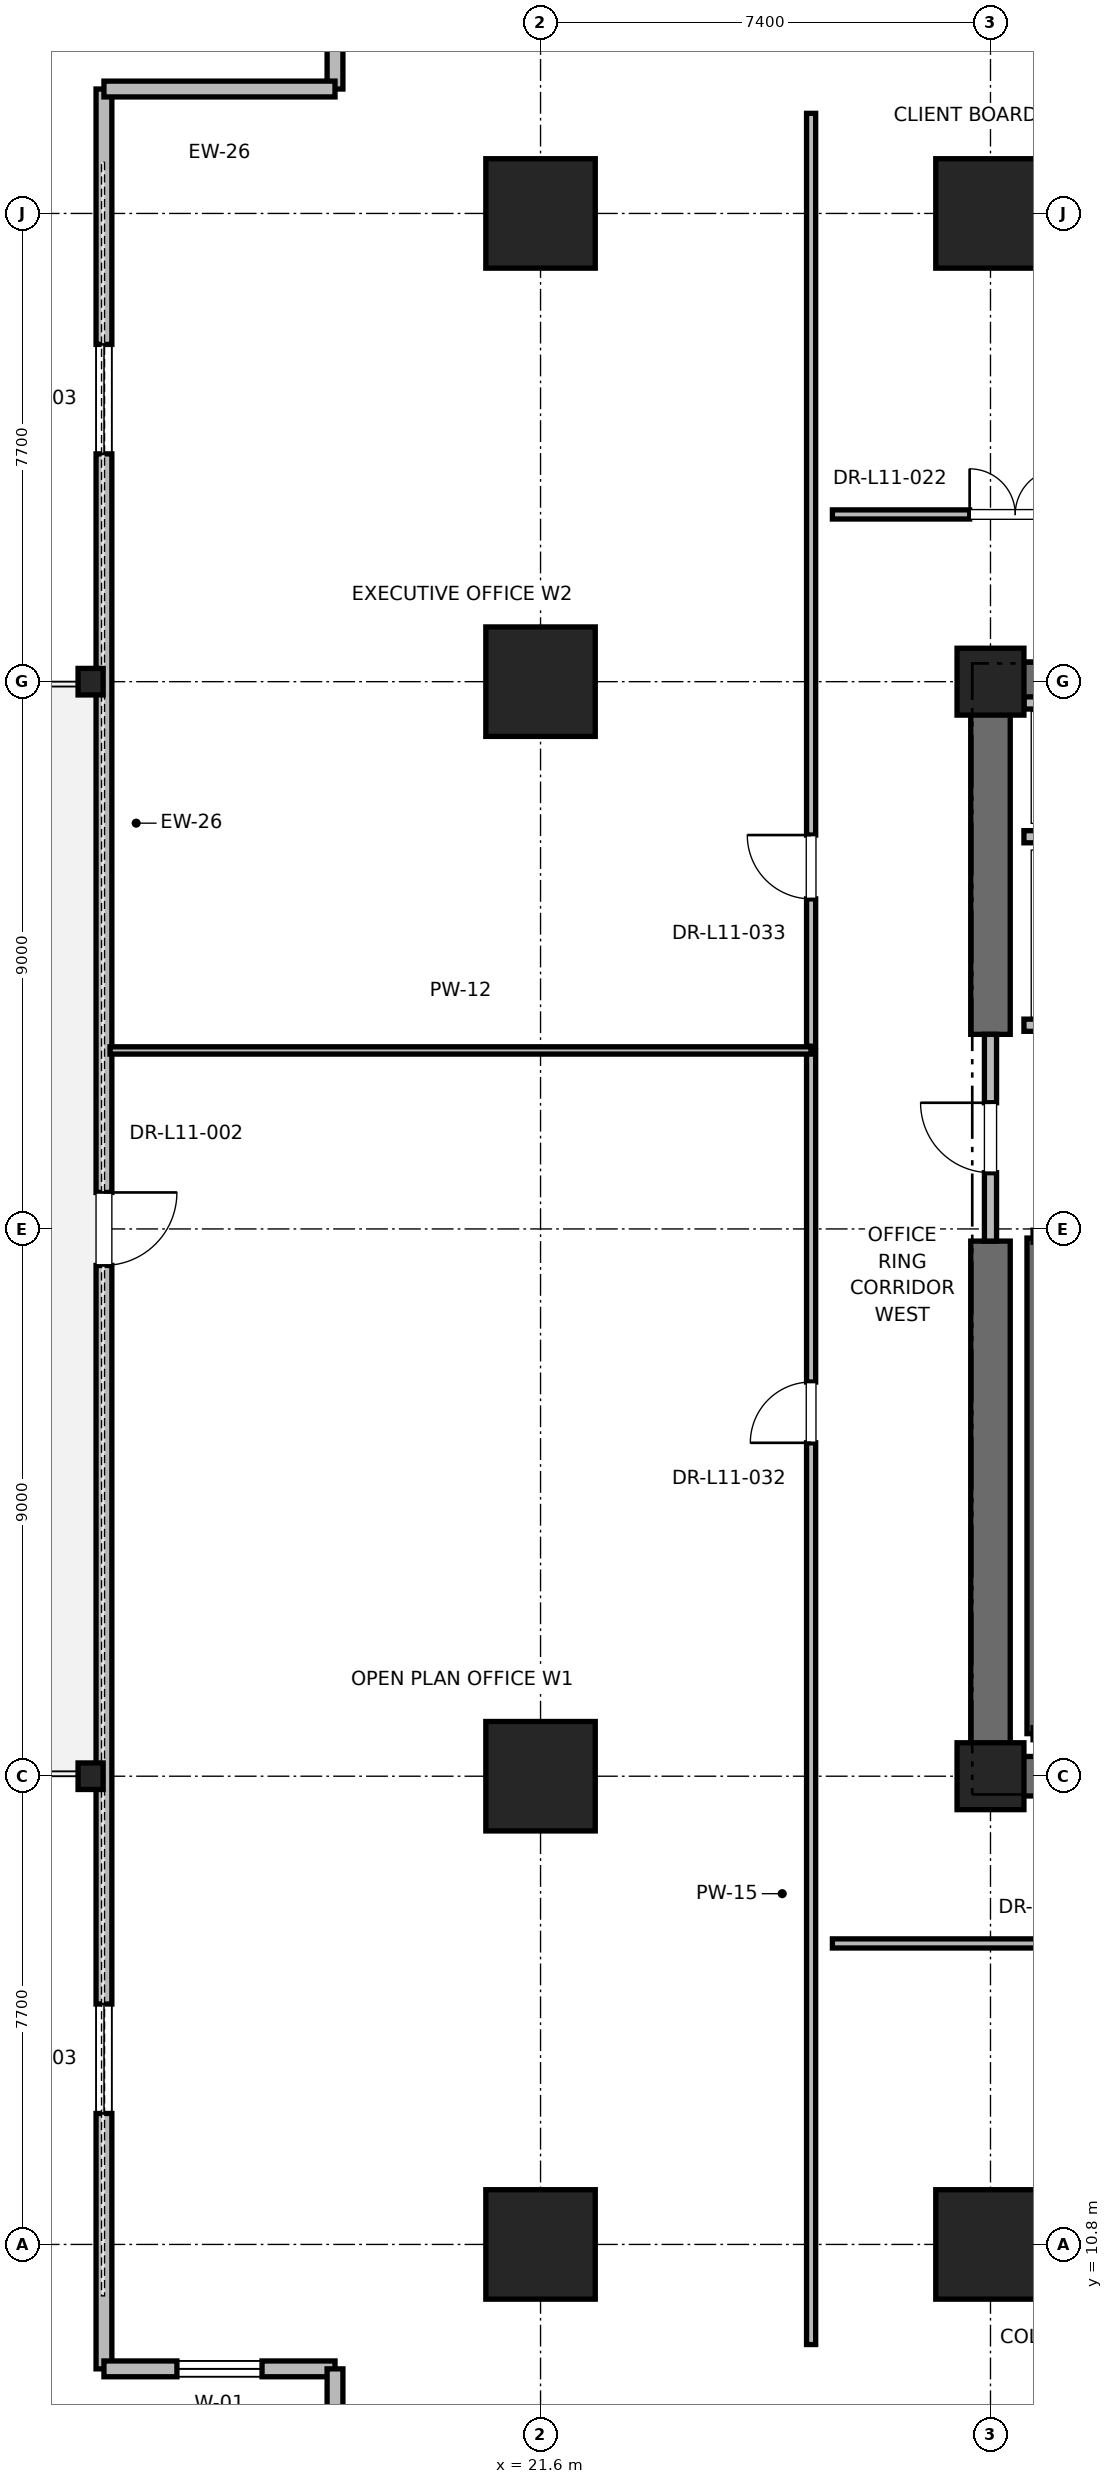
"""IFC4 building model, lengths in metres.
Left out: names, types, materials, properties, quantities, classifications, styles, units other than length and angle.
Written with IfcOpenShell. Run it as: python <this file> out.ifc"""

import sys

from ifc_helpers import new_model, si_unit, direction, frame, frame_2d, origin, origin_2d, place, context, subcontext, project, spatial, rectangle, i_section, extrude, element, fill, save


model = new_model("IFC4")
c1 = context("Model", 3, precision=1e-05, world=origin(), true_north=direction((0.0, 1.0)))
c2 = subcontext(c1, "Body", "Model", "MODEL_VIEW")
j1 = project(units=[si_unit("LENGTHUNIT", "METRE"), si_unit("PLANEANGLEUNIT", "RADIAN")], contexts=[c1])
p1 = place(None, origin())
s1 = spatial("IfcSite", under=j1, at=p1, CompositionType="ELEMENT")
p2 = place(p1, origin())
s2 = spatial("IfcBuilding", under=s1, at=p2, CompositionType="ELEMENT")
p3 = place(p2, frame((0.0, 0.0, 51.6)))
s3 = spatial("IfcBuildingStorey", under=s2, at=p3, CompositionType="ELEMENT", Elevation=51.6)
for number, where, z_axis, x_axis in (
    (1, (29.0, 10.8, 0.0), (0.0, 0.0, 1.0), (1.0, 0.0, 0.0)),
    (2, (29.0, 44.2, 0.0), (0.0, 0.0, 1.0), (1.0, 0.0, 0.0)),
    (3, (21.6, 18.5, 0.0), (0.0, 0.0, 1.0), (1.0, 0.0, 0.0)),
    (4, (21.6, 36.5, 0.0), (0.0, 0.0, 1.0), (1.0, 0.0, 0.0)),
    (5, (21.6, 10.8, 0.0), (0.0, 0.0, 1.0), (1.0, 0.0, 0.0)),
    (6, (21.6, 44.2, 0.0), (0.0, 0.0, 1.0), (1.0, 0.0, 0.0)),
):
    element("IfcColumn", number, at=place(p3, frame(where, z_axis=z_axis, x_axis=x_axis)), inside=s3, PredefinedType="COLUMN", context=c2, shape_type="SweptSolid", body=[
        extrude(rectangle(XDim=1.8, YDim=1.8, at=origin_2d()), origin(), (0.0, 0.0, 1.0), 4.0),
    ])
for number, where, z_axis, x_axis in (
    (7, (14.2, 18.5, 0.0), (0.0, 0.0, 1.0), (1.0, 0.0, 0.0)),
    (8, (14.2, 36.5, 0.0), (0.0, 0.0, 1.0), (1.0, 0.0, 0.0)),
):
    element("IfcColumn", number, at=place(p3, frame(where, z_axis=z_axis, x_axis=x_axis)), inside=s3, PredefinedType="COLUMN", context=c2, shape_type="SweptSolid", body=[
        extrude(i_section(OverallWidth=0.412, OverallDepth=0.437, WebThickness=0.036, FlangeThickness=0.058, FilletRadius=0.015, at=origin_2d()), origin(), (0.0, 0.0, 1.0), 4.0),
    ])
for number, where, z_axis, x_axis in (
    (9, (29.0, 18.5, 0.0), (0.0, 0.0, 1.0), (1.0, 0.0, 0.0)),
    (10, (29.0, 36.5, 0.0), (0.0, 0.0, 1.0), (1.0, 0.0, 0.0)),
):
    element("IfcColumn", number, at=place(p3, frame(where, z_axis=z_axis, x_axis=x_axis)), inside=s3, PredefinedType="PILASTER", context=c2, shape_type="SweptSolid", body=[
        extrude(rectangle(XDim=1.1, YDim=1.1, at=origin_2d()), origin(), (0.0, 0.0, 1.0), 4.0),
    ])
p4 = place(p3, frame((29.0, 18.5, 0.0), z_axis=(0.0, 0.0, 1.0), x_axis=(1.0, 0.0, 0.0)))
e11 = element("IfcWall", 11, at=p4, inside=s3, PredefinedType="SHEAR", context=c2, shape_type="SweptSolid", body=[
    extrude(rectangle(XDim=9.2, YDim=0.65, at=frame_2d((4.6, 0.0))), origin(), (0.0, 0.0, 1.0), 3.76),
])
p5 = place(p3, frame((29.0, 36.5, 0.0), z_axis=(0.0, 0.0, 1.0), x_axis=(1.0, 0.0, 0.0)))
e12 = element("IfcWall", 12, at=p5, inside=s3, PredefinedType="SHEAR", context=c2, shape_type="SweptSolid", body=[
    extrude(rectangle(XDim=5.8, YDim=0.65, at=frame_2d((2.9, 0.0))), origin(), (0.0, 0.0, 1.0), 3.76),
])
p6 = place(p3, frame((29.0, 18.5, 0.0), z_axis=(0.0, 0.0, 1.0), x_axis=(0.0, 1.0, 0.0)))
e13 = element("IfcWall", 13, at=p6, inside=s3, PredefinedType="SHEAR", context=c2, shape_type="SweptSolid", body=[
    extrude(rectangle(XDim=8.8, YDim=0.65, at=frame_2d((4.4, 0.0))), origin(), (0.0, 0.0, 1.0), 3.76),
])
p7 = place(p3, frame((29.0, 30.7, 0.0), z_axis=(0.0, 0.0, 1.0), x_axis=(0.0, 1.0, 0.0)))
e14 = element("IfcWall", 14, at=p7, inside=s3, PredefinedType="SHEAR", context=c2, shape_type="SweptSolid", body=[
    extrude(rectangle(XDim=5.8, YDim=0.65, at=frame_2d((2.9, 0.0))), origin(), (0.0, 0.0, 1.0), 3.76),
])
p8 = place(p3, frame((14.42, 46.246, 0.0), z_axis=(0.0, 0.0, 1.0), x_axis=(0.0, -1.0, 0.0)))
e15 = element("IfcWall", 15, at=p8, inside=s3, PredefinedType="PARAPET", context=c2, shape_type="SweptSolid", body=[
    extrude(rectangle(XDim=37.492, YDim=0.26, at=frame_2d((18.746, 0.0))), origin(), (0.0, 0.0, 1.0), 2.889),
])
p9 = place(p8, frame((4.2, 0.0, 0.85)))
e16 = element("IfcOpeningElement", 16, at=p9, cuts=e15, PredefinedType="OPENING", context=c2, shape_type="SweptSolid", body=[
    extrude(rectangle(XDim=1.8, YDim=2.2, at=frame_2d((0.9, 1.1))), frame((0.0, 0.13, 0.0), z_axis=(0.0, -1.0, 0.0), x_axis=(1.0, 0.0, 0.0)), (0.0, 0.0, 1.0), 0.26),
])
p10 = place(p8, frame((18.146, 0.0, 0.0)))
e17 = element("IfcOpeningElement", 17, at=p10, cuts=e15, PredefinedType="OPENING", context=c2, shape_type="SweptSolid", body=[
    extrude(rectangle(XDim=1.2, YDim=2.2, at=frame_2d((0.6, 1.1))), frame((0.0, 0.13, 0.0), z_axis=(0.0, -1.0, 0.0), x_axis=(1.0, 0.0, 0.0)), (0.0, 0.0, 1.0), 0.26),
])
p11 = place(p8, frame((31.492, 0.0, 0.85)))
e18 = element("IfcOpeningElement", 18, at=p11, cuts=e15, PredefinedType="OPENING", context=c2, shape_type="SweptSolid", body=[
    extrude(rectangle(XDim=1.8, YDim=2.2, at=frame_2d((0.9, 1.1))), frame((0.0, 0.13, 0.0), z_axis=(0.0, -1.0, 0.0), x_axis=(1.0, 0.0, 0.0)), (0.0, 0.0, 1.0), 0.26),
])
p12 = place(p3, frame((14.42, 8.754, 0.0), z_axis=(0.0, 0.0, 1.0), x_axis=(1.0, 0.0, 0.0)))
e19 = element("IfcWall", 19, at=p12, inside=s3, PredefinedType="PARAPET", context=c2, shape_type="SweptSolid", body=[
    extrude(rectangle(XDim=3.8, YDim=0.26, at=frame_2d((1.9, 0.0))), origin(), (0.0, 0.0, 1.0), 3.76),
])
p13 = place(p12, frame((1.2, 0.0, 0.85)))
e20 = element("IfcOpeningElement", 20, at=p13, cuts=e19, PredefinedType="OPENING", context=c2, shape_type="SweptSolid", body=[
    extrude(rectangle(XDim=1.4, YDim=2.0, at=frame_2d((0.7, 1.0))), frame((0.0, 0.13, 0.0), z_axis=(0.0, -1.0, 0.0), x_axis=(1.0, 0.0, 0.0)), (0.0, 0.0, 1.0), 0.26),
])
p14 = place(p3, frame((18.22, 8.754, 0.0), z_axis=(0.0, 0.0, 1.0), x_axis=(0.0, -1.0, 0.0)))
e21 = element("IfcWall", 21, at=p14, inside=s3, PredefinedType="PARAPET", context=c2, shape_type="SweptSolid", body=[
    extrude(rectangle(XDim=3.4, YDim=0.26, at=frame_2d((1.7, 0.0))), origin(), (0.0, 0.0, 1.0), 3.76),
])
p15 = place(p3, frame((18.22, 49.646, 0.0), z_axis=(0.0, 0.0, 1.0), x_axis=(0.0, -1.0, 0.0)))
e22 = element("IfcWall", 22, at=p15, inside=s3, PredefinedType="PARAPET", context=c2, shape_type="SweptSolid", body=[
    extrude(rectangle(XDim=3.4, YDim=0.26, at=frame_2d((1.7, 0.0))), origin(), (0.0, 0.0, 1.0), 3.76),
])
p16 = place(p15, frame((1.0, 0.0, 0.85)))
e23 = element("IfcOpeningElement", 23, at=p16, cuts=e22, PredefinedType="OPENING", context=c2, shape_type="SweptSolid", body=[
    extrude(rectangle(XDim=1.4, YDim=2.0, at=frame_2d((0.7, 1.0))), frame((0.0, 0.13, 0.0), z_axis=(0.0, -1.0, 0.0), x_axis=(1.0, 0.0, 0.0)), (0.0, 0.0, 1.0), 0.26),
])
p17 = place(p3, frame((18.22, 46.246, 0.0), z_axis=(0.0, 0.0, 1.0), x_axis=(-1.0, 0.0, 0.0)))
e24 = element("IfcWall", 24, at=p17, inside=s3, PredefinedType="PARAPET", context=c2, shape_type="SweptSolid", body=[
    extrude(rectangle(XDim=3.8, YDim=0.26, at=frame_2d((1.9, 0.0))), origin(), (0.0, 0.0, 1.0), 3.76),
])
p18 = place(p3, frame((29.7, 19.2, 0.0), z_axis=(0.0, 0.0, 1.0), x_axis=(0.0, 1.0, 0.0)))
e25 = element("IfcWall", 25, at=p18, inside=s3, PredefinedType="SOLIDWALL", context=c2, shape_type="SweptSolid", body=[
    extrude(rectangle(XDim=8.15, YDim=0.2, at=frame_2d((4.075, 0.0))), origin(), (0.0, 0.0, 1.0), 3.76),
])
p19 = place(p3, frame((29.0, 27.3, 0.0), z_axis=(0.0, 0.0, 1.0), x_axis=(0.0, 1.0, 0.0)))
e26 = element("IfcWall", 26, at=p19, inside=s3, PredefinedType="PARTITIONING", context=c2, shape_type="SweptSolid", body=[
    extrude(rectangle(XDim=3.4, YDim=0.2, at=frame_2d((1.7, 0.0))), origin(), (0.0, 0.0, 1.0), 2.54),
])
p20 = place(p19, frame((1.125, 0.0, 0.0)))
e27 = element("IfcOpeningElement", 27, at=p20, cuts=e26, PredefinedType="OPENING", context=c2, shape_type="SweptSolid", body=[
    extrude(rectangle(XDim=1.15, YDim=2.2, at=frame_2d((0.575, 1.1))), frame((0.0, 0.1, 0.0), z_axis=(0.0, -1.0, 0.0), x_axis=(1.0, 0.0, 0.0)), (0.0, 0.0, 1.0), 0.2),
])
p21 = place(p3, frame((29.55, 30.85, 0.0), z_axis=(0.0, 0.0, 1.0), x_axis=(1.0, 0.0, 0.0)))
e28 = element("IfcWall", 28, at=p21, inside=s3, PredefinedType="SOLIDWALL", context=c2, shape_type="SweptSolid", body=[
    extrude(rectangle(XDim=2.6, YDim=0.2, at=frame_2d((1.3, 0.0))), origin(), (0.0, 0.0, 1.0), 2.54),
])
p22 = place(p21, frame((0.75, 0.0, 0.0)))
e29 = element("IfcOpeningElement", 29, at=p22, cuts=e28, PredefinedType="OPENING", context=c2, shape_type="SweptSolid", body=[
    extrude(rectangle(XDim=1.1, YDim=2.2, at=frame_2d((0.55, 1.1))), frame((0.0, 0.1, 0.0), z_axis=(0.0, -1.0, 0.0), x_axis=(1.0, 0.0, 0.0)), (0.0, 0.0, 1.0), 0.2),
])
p23 = place(p3, frame((29.55, 33.95, 0.0), z_axis=(0.0, 0.0, 1.0), x_axis=(1.0, 0.0, 0.0)))
e30 = element("IfcWall", 30, at=p23, inside=s3, PredefinedType="SOLIDWALL", context=c2, shape_type="SweptSolid", body=[
    extrude(rectangle(XDim=2.8, YDim=0.2, at=frame_2d((1.4, 0.0))), origin(), (0.0, 0.0, 1.0), 3.76),
])
p24 = place(p3, frame((32.35, 36.15, 0.0), z_axis=(0.0, 0.0, 1.0), x_axis=(-1.0, 0.0, 0.0)))
e31 = element("IfcWall", 31, at=p24, inside=s3, PredefinedType="SOLIDWALL", context=c2, shape_type="SweptSolid", body=[
    extrude(rectangle(XDim=2.8, YDim=0.2, at=frame_2d((1.4, 0.0))), origin(), (0.0, 0.0, 1.0), 2.889),
])
p25 = place(p3, frame((26.4, 39.25, 0.0), z_axis=(0.0, 0.0, 1.0), x_axis=(1.0, 0.0, 0.0)))
e32 = element("IfcWall", 32, at=p25, inside=s3, PredefinedType="PARTITIONING", context=c2, shape_type="SweptSolid", body=[
    extrude(rectangle(XDim=5.984, YDim=0.15, at=frame_2d((2.992, 0.0))), origin(), (0.0, 0.0, 1.0), 2.85),
])
p26 = place(p25, frame((2.257, 0.0, 0.0)))
e33 = element("IfcOpeningElement", 33, at=p26, cuts=e32, PredefinedType="OPENING", context=c2, shape_type="SweptSolid", body=[
    extrude(rectangle(XDim=1.5, YDim=2.25, at=frame_2d((0.75, 1.125))), frame((0.0, 0.075, 0.0), z_axis=(0.0, -1.0, 0.0), x_axis=(1.0, 0.0, 0.0)), (0.0, 0.0, 1.0), 0.15),
])
p27 = place(p3, frame((26.4, 15.75, 0.0), z_axis=(0.0, 0.0, 1.0), x_axis=(1.0, 0.0, 0.0)))
e34 = element("IfcWall", 34, at=p27, inside=s3, PredefinedType="PARTITIONING", context=c2, shape_type="SweptSolid", body=[
    extrude(rectangle(XDim=11.424, YDim=0.15, at=frame_2d((5.712, 0.0))), origin(), (0.0, 0.0, 1.0), 2.85),
])
p28 = place(p27, frame((5.227, 0.0, 0.0)))
e35 = element("IfcOpeningElement", 35, at=p28, cuts=e34, PredefinedType="OPENING", context=c2, shape_type="SweptSolid", body=[
    extrude(rectangle(XDim=1.0, YDim=2.15, at=frame_2d((0.5, 1.075))), frame((0.0, 0.075, 0.0), z_axis=(0.0, -1.0, 0.0), x_axis=(1.0, 0.0, 0.0)), (0.0, 0.0, 1.0), 0.15),
])
p29 = place(p3, frame((26.05, 9.154, 0.0), z_axis=(0.0, 0.0, 1.0), x_axis=(0.0, 1.0, 0.0)))
e36 = element("IfcWall", 36, at=p29, inside=s3, PredefinedType="PARTITIONING", context=c2, shape_type="SweptSolid", body=[
    extrude(rectangle(XDim=21.281, YDim=0.15, at=frame_2d((10.641, 0.0))), origin(), (0.0, 0.0, 1.0), 2.85),
])
p30 = place(p29, frame((14.829, 0.0, 0.0)))
e37 = element("IfcOpeningElement", 37, at=p30, cuts=e36, PredefinedType="OPENING", context=c2, shape_type="SweptSolid", body=[
    extrude(rectangle(XDim=1.0, YDim=2.15, at=frame_2d((0.5, 1.075))), frame((0.0, 0.075, 0.0), z_axis=(0.0, -1.0, 0.0), x_axis=(1.0, 0.0, 0.0)), (0.0, 0.0, 1.0), 0.15),
])
p31 = place(p3, frame((14.52, 30.435, 0.0), z_axis=(0.0, 0.0, 1.0), x_axis=(1.0, 0.0, 0.0)))
e38 = element("IfcWall", 38, at=p31, inside=s3, PredefinedType="PARTITIONING", context=c2, shape_type="SweptSolid", body=[
    extrude(rectangle(XDim=11.53, YDim=0.12, at=frame_2d((5.765, 0.0))), origin(), (0.0, 0.0, 1.0), 2.85),
])
p32 = place(p3, frame((26.05, 30.505, 0.0), z_axis=(0.0, 0.0, 1.0), x_axis=(0.0, 1.0, 0.0)))
e39 = element("IfcWall", 39, at=p32, inside=s3, PredefinedType="PARTITIONING", context=c2, shape_type="SweptSolid", body=[
    extrude(rectangle(XDim=15.341, YDim=0.15, at=frame_2d((7.67, 0.0))), origin(), (0.0, 0.0, 1.0), 2.85),
])
p33 = place(p32, frame((2.422, 0.0, 0.0)))
e40 = element("IfcOpeningElement", 40, at=p33, cuts=e39, PredefinedType="OPENING", context=c2, shape_type="SweptSolid", body=[
    extrude(rectangle(XDim=1.05, YDim=2.2, at=frame_2d((0.525, 1.1))), frame((0.0, 0.075, 0.0), z_axis=(0.0, -1.0, 0.0), x_axis=(1.0, 0.0, 0.0)), (0.0, 0.0, 1.0), 0.15),
])
p34 = place(p9, origin())
e41 = element("IfcWindow", 41, at=p34, inside=s3, PartitioningType="SINGLE_PANEL", PredefinedType="WINDOW", context=c2, shape_type="SweptSolid", body=[
    extrude(rectangle(XDim=1.8, YDim=2.2, at=frame_2d((0.9, 1.1))), frame((0.0, 0.03, 0.0), z_axis=(0.0, -1.0, 0.0), x_axis=(1.0, 0.0, 0.0)), (0.0, 0.0, 1.0), 0.06),
])
fill(e16, e41)
p35 = place(p10, origin())
e42 = element("IfcDoor", 42, at=p35, inside=s3, OperationType="SINGLE_SWING_LEFT", PredefinedType="DOOR", context=c2, shape_type="SweptSolid", body=[
    extrude(rectangle(XDim=1.2, YDim=2.2, at=frame_2d((0.6, 1.1))), frame((0.0, 0.025, 0.0), z_axis=(0.0, -1.0, 0.0), x_axis=(1.0, 0.0, 0.0)), (0.0, 0.0, 1.0), 0.05),
])
fill(e17, e42)
p36 = place(p11, origin())
e43 = element("IfcWindow", 43, at=p36, inside=s3, PartitioningType="SINGLE_PANEL", PredefinedType="WINDOW", context=c2, shape_type="SweptSolid", body=[
    extrude(rectangle(XDim=1.8, YDim=2.2, at=frame_2d((0.9, 1.1))), frame((0.0, 0.03, 0.0), z_axis=(0.0, -1.0, 0.0), x_axis=(1.0, 0.0, 0.0)), (0.0, 0.0, 1.0), 0.06),
])
fill(e18, e43)
p37 = place(p13, origin())
e44 = element("IfcWindow", 44, at=p37, inside=s3, PartitioningType="SINGLE_PANEL", PredefinedType="WINDOW", context=c2, shape_type="SweptSolid", body=[
    extrude(rectangle(XDim=1.4, YDim=2.0, at=frame_2d((0.7, 1.0))), frame((0.0, 0.03, 0.0), z_axis=(0.0, -1.0, 0.0), x_axis=(1.0, 0.0, 0.0)), (0.0, 0.0, 1.0), 0.06),
])
fill(e20, e44)
p38 = place(p20, origin())
e45 = element("IfcDoor", 45, at=p38, inside=s3, OperationType="SINGLE_SWING_RIGHT", PredefinedType="DOOR", context=c2, shape_type="SweptSolid", body=[
    extrude(rectangle(XDim=1.15, YDim=2.2, at=frame_2d((0.575, 1.1))), frame((0.0, 0.025, 0.0), z_axis=(0.0, -1.0, 0.0), x_axis=(1.0, 0.0, 0.0)), (0.0, 0.0, 1.0), 0.05),
])
fill(e27, e45)
p39 = place(p26, origin())
e46 = element("IfcDoor", 46, at=p39, inside=s3, OperationType="DOUBLE_DOOR_SINGLE_SWING", PredefinedType="DOOR", context=c2, shape_type="SweptSolid", body=[
    extrude(rectangle(XDim=1.5, YDim=2.25, at=frame_2d((0.75, 1.125))), frame((0.0, 0.025, 0.0), z_axis=(0.0, -1.0, 0.0), x_axis=(1.0, 0.0, 0.0)), (0.0, 0.0, 1.0), 0.05),
])
fill(e33, e46)
p40 = place(p30, origin())
e47 = element("IfcDoor", 47, at=p40, inside=s3, OperationType="SINGLE_SWING_LEFT", PredefinedType="DOOR", context=c2, shape_type="SweptSolid", body=[
    extrude(rectangle(XDim=1.0, YDim=2.15, at=frame_2d((0.5, 1.075))), frame((0.0, 0.025, 0.0), z_axis=(0.0, -1.0, 0.0), x_axis=(1.0, 0.0, 0.0)), (0.0, 0.0, 1.0), 0.05),
])
fill(e37, e47)
p41 = place(p33, origin())
e48 = element("IfcDoor", 48, at=p41, inside=s3, OperationType="SINGLE_SWING_RIGHT", PredefinedType="DOOR", context=c2, shape_type="SweptSolid", body=[
    extrude(rectangle(XDim=1.05, YDim=2.2, at=frame_2d((0.525, 1.1))), frame((0.0, 0.025, 0.0), z_axis=(0.0, -1.0, 0.0), x_axis=(1.0, 0.0, 0.0)), (0.0, 0.0, 1.0), 0.05),
])
fill(e40, e48)
save(model, sys.argv[1])
